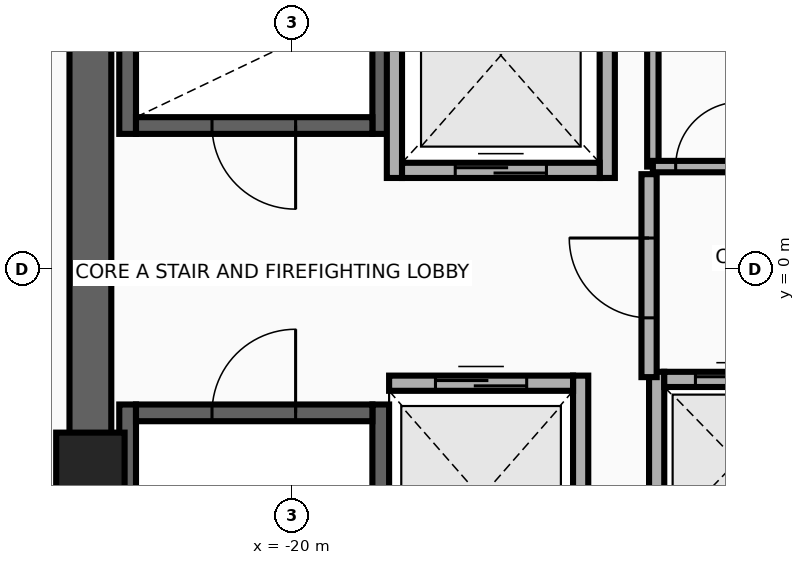
"""IFC4 building model, lengths in metres.
Left out: names, types, materials, properties, quantities, classifications, styles, units other than length and angle.
Written with IfcOpenShell. Run it as: python <this file> out.ifc"""

import sys

from ifc_helpers import new_model, si_unit, direction, frame, frame_2d, origin, origin_2d, place, context, subcontext, project, spatial, rectangle, extrude, source, transform, mapped, element, fill, save


model = new_model("IFC4")
c1 = context("Model", 3, precision=1e-05, world=origin(), true_north=direction((0.0, 1.0)))
c2 = subcontext(c1, "Body", "Model", "MODEL_VIEW")
j1 = project(units=[si_unit("LENGTHUNIT", "METRE"), si_unit("PLANEANGLEUNIT", "RADIAN")], contexts=[c1])
p1 = place(None, origin())
s1 = spatial("IfcSite", under=j1, at=p1, CompositionType="ELEMENT")
p2 = place(p1, origin())
s2 = spatial("IfcBuilding", under=s1, at=p2, CompositionType="ELEMENT")
p3 = place(p2, frame((0.0, 0.0, 219.5)))
s3 = spatial("IfcBuildingStorey", under=s2, at=p3, CompositionType="ELEMENT", Elevation=219.5)
for number, where, z_axis, x_axis in (
    (1, (-22.16, 1.78, 0.0), (0.0, 0.0, 1.0), (0.0, 1.0, 0.0)),
    (2, (-18.83, 1.78, 0.0), (0.0, 0.0, 1.0), (0.0, 1.0, 0.0)),
):
    element("IfcWall", number, at=place(p3, frame(where, z_axis=z_axis, x_axis=x_axis)), inside=s3, PredefinedType="SHEAR", context=c2, shape_type="SweptSolid", body=[
        extrude(rectangle(XDim=8.745, YDim=0.22, at=frame_2d((4.373, 0.0))), origin(), (0.0, 0.0, 1.0), 3.26),
    ])
p4 = place(p3, frame((-22.05, 1.89, 0.0), z_axis=(0.0, 0.0, 1.0), x_axis=(1.0, 0.0, 0.0)))
e3 = element("IfcWall", 3, at=p4, inside=s3, PredefinedType="SHEAR", context=c2, shape_type="SweptSolid", body=[
    extrude(rectangle(XDim=3.11, YDim=0.22, at=frame_2d((1.555, 0.0))), origin(), (0.0, 0.0, 1.0), 3.26),
])
p5 = place(p4, frame((1.0, 0.0, 0.0)))
e4 = element("IfcOpeningElement", 4, at=p5, cuts=e3, PredefinedType="OPENING", context=c2, shape_type="SweptSolid", body=[
    extrude(rectangle(XDim=1.1, YDim=2.15, at=frame_2d((0.55, 1.075))), frame((0.0, 0.125, 0.0), z_axis=(0.0, -1.0, 0.0), x_axis=(1.0, 0.0, 0.0)), (0.0, 0.0, 1.0), 0.25),
])
for number, where, z_axis, x_axis in (
    (5, (-22.16, -10.525, 0.0), (0.0, 0.0, 1.0), (0.0, 1.0, 0.0)),
    (6, (-18.83, -10.525, 0.0), (0.0, 0.0, 1.0), (0.0, 1.0, 0.0)),
):
    element("IfcWall", number, at=place(p3, frame(where, z_axis=z_axis, x_axis=x_axis)), inside=s3, PredefinedType="SHEAR", context=c2, shape_type="SweptSolid", body=[
        extrude(rectangle(XDim=8.745, YDim=0.22, at=frame_2d((4.373, 0.0))), origin(), (0.0, 0.0, 1.0), 3.26),
    ])
p6 = place(p3, frame((-22.05, -1.89, 0.0), z_axis=(0.0, 0.0, 1.0), x_axis=(1.0, 0.0, 0.0)))
e7 = element("IfcWall", 7, at=p6, inside=s3, PredefinedType="SHEAR", context=c2, shape_type="SweptSolid", body=[
    extrude(rectangle(XDim=3.11, YDim=0.22, at=frame_2d((1.555, 0.0))), origin(), (0.0, 0.0, 1.0), 3.26),
])
p7 = place(p6, frame((1.0, 0.0, 0.0)))
e8 = element("IfcOpeningElement", 8, at=p7, cuts=e7, PredefinedType="OPENING", context=c2, shape_type="SweptSolid", body=[
    extrude(rectangle(XDim=1.1, YDim=2.15, at=frame_2d((0.55, 1.075))), frame((0.0, 0.125, 0.0), z_axis=(0.0, -1.0, 0.0), x_axis=(1.0, 0.0, 0.0)), (0.0, 0.0, 1.0), 0.25),
])
p8 = place(p3, frame((-22.65, -11.075, 0.0), z_axis=(0.0, 0.0, 1.0), x_axis=(0.0, 1.0, 0.0)))
e9 = element("IfcWall", 9, at=p8, inside=s3, PredefinedType="SHEAR", context=c2, shape_type="SweptSolid", body=[
    extrude(rectangle(XDim=22.15, YDim=0.55, at=frame_2d((11.075, 0.0))), origin(), (0.0, 0.0, 1.0), 3.26),
])
m1 = source(origin(), c2, "Body", "SweptSolid", [
    extrude(rectangle(XDim=0.9, YDim=0.9, at=origin_2d()), origin(), (0.0, 0.0, 1.0), 3.5),
])
p9 = place(p3, frame((-22.65, -2.6, 0.0), z_axis=(0.0, 0.0, 1.0), x_axis=(1.0, 0.0, 0.0)))
e10 = element("IfcColumn", 10, at=p9, inside=s3, PredefinedType="COLUMN", context=c2, shape_type="MappedRepresentation", body=[
    mapped(m1, transform((0.0, 0.0, 0.0), x_axis=(1.0, 0.0, 0.0), y_axis=(0.0, 1.0, 0.0), z_axis=(0.0, 0.0, 1.0), scale=1.0)),
])
for number, where, z_axis, x_axis in (
    (11, (-18.65, 1.2, 0.0), (0.0, 0.0, 1.0), (0.0, 1.0, 0.0)),
    (12, (-15.85, 1.2, 0.0), (0.0, 0.0, 1.0), (0.0, 1.0, 0.0)),
):
    element("IfcWall", number, at=place(p3, frame(where, z_axis=z_axis, x_axis=x_axis)), inside=s3, PredefinedType="MOVABLE", context=c2, shape_type="SweptSolid", body=[
        extrude(rectangle(XDim=3.225, YDim=0.2, at=frame_2d((1.613, 0.0))), origin(), (0.0, 0.0, 1.0), 3.26),
    ])
p10 = place(p3, frame((-18.55, 1.3, 0.0), z_axis=(0.0, 0.0, 1.0), x_axis=(1.0, 0.0, 0.0)))
e13 = element("IfcWall", 13, at=p10, inside=s3, PredefinedType="MOVABLE", context=c2, shape_type="SweptSolid", body=[
    extrude(rectangle(XDim=2.6, YDim=0.2, at=frame_2d((1.3, 0.0))), origin(), (0.0, 0.0, 1.0), 3.26),
])
p11 = place(p10, frame((0.7, 0.0, 0.0)))
e14 = element("IfcOpeningElement", 14, at=p11, cuts=e13, PredefinedType="OPENING", context=c2, shape_type="SweptSolid", body=[
    extrude(rectangle(XDim=1.2, YDim=2.1, at=frame_2d((0.6, 1.05))), frame((0.0, 0.115, 0.0), z_axis=(0.0, -1.0, 0.0), x_axis=(1.0, 0.0, 0.0)), (0.0, 0.0, 1.0), 0.23),
])
p12 = place(p3, frame((-16.2, -4.6, 0.0), z_axis=(0.0, 0.0, 1.0), x_axis=(0.0, 1.0, 0.0)))
e15 = element("IfcWall", 15, at=p12, inside=s3, PredefinedType="MOVABLE", context=c2, shape_type="SweptSolid", body=[
    extrude(rectangle(XDim=3.2, YDim=0.2, at=frame_2d((1.6, 0.0))), origin(), (0.0, 0.0, 1.0), 3.26),
])
p13 = place(p3, frame((-18.72, -1.5, 0.0), z_axis=(0.0, 0.0, 1.0), x_axis=(1.0, 0.0, 0.0)))
e16 = element("IfcWall", 16, at=p13, inside=s3, PredefinedType="MOVABLE", context=c2, shape_type="SweptSolid", body=[
    extrude(rectangle(XDim=2.42, YDim=0.2, at=frame_2d((1.21, 0.0))), origin(), (0.0, 0.0, 1.0), 3.26),
])
p14 = place(p13, frame((0.61, 0.0, 0.0)))
e17 = element("IfcOpeningElement", 17, at=p14, cuts=e16, PredefinedType="OPENING", context=c2, shape_type="SweptSolid", body=[
    extrude(rectangle(XDim=1.2, YDim=2.1, at=frame_2d((0.6, 1.05))), frame((0.0, 0.115, 0.0), z_axis=(0.0, -1.0, 0.0), x_axis=(1.0, 0.0, 0.0)), (0.0, 0.0, 1.0), 0.23),
])
p15 = place(p3, frame((-15.2, -3.7, 0.0), z_axis=(0.0, 0.0, 1.0), x_axis=(0.0, 1.0, 0.0)))
e18 = element("IfcWall", 18, at=p15, inside=s3, PredefinedType="MOVABLE", context=c2, shape_type="SweptSolid", body=[
    extrude(rectangle(XDim=2.35, YDim=0.2, at=frame_2d((1.175, 0.0))), origin(), (0.0, 0.0, 1.0), 3.26),
])
p16 = place(p3, frame((-15.1, -1.45, 0.0), z_axis=(0.0, 0.0, 1.0), x_axis=(1.0, 0.0, 0.0)))
e19 = element("IfcWall", 19, at=p16, inside=s3, PredefinedType="MOVABLE", context=c2, shape_type="SweptSolid", body=[
    extrude(rectangle(XDim=1.92, YDim=0.2, at=frame_2d((0.96, 0.0))), origin(), (0.0, 0.0, 1.0), 3.26),
])
p17 = place(p16, frame((0.41, 0.0, 0.0)))
e20 = element("IfcOpeningElement", 20, at=p17, cuts=e19, PredefinedType="OPENING", context=c2, shape_type="SweptSolid", body=[
    extrude(rectangle(XDim=1.1, YDim=2.1, at=frame_2d((0.55, 1.05))), frame((0.0, 0.115, 0.0), z_axis=(0.0, -1.0, 0.0), x_axis=(1.0, 0.0, 0.0)), (0.0, 0.0, 1.0), 0.23),
])
p18 = place(p3, frame((-15.3, -1.42, 0.0), z_axis=(0.0, 0.0, 1.0), x_axis=(0.0, 1.0, 0.0)))
e21 = element("IfcWall", 21, at=p18, inside=s3, PredefinedType="PARTITIONING", context=c2, shape_type="SweptSolid", body=[
    extrude(rectangle(XDim=2.67, YDim=0.2, at=frame_2d((1.335, 0.0))), origin(), (0.0, 0.0, 1.0), 3.26),
])
p19 = place(p18, frame((0.78, 0.0, 0.0)))
e22 = element("IfcOpeningElement", 22, at=p19, cuts=e21, PredefinedType="OPENING", context=c2, shape_type="SweptSolid", body=[
    extrude(rectangle(XDim=1.05, YDim=2.15, at=frame_2d((0.525, 1.075))), frame((0.0, 0.115, 0.0), z_axis=(0.0, -1.0, 0.0), x_axis=(1.0, 0.0, 0.0)), (0.0, 0.0, 1.0), 0.23),
])
p20 = place(p3, frame((-15.25, 1.35, 0.0), z_axis=(0.0, 0.0, 1.0), x_axis=(0.0, 1.0, 0.0)))
e23 = element("IfcWall", 23, at=p20, inside=s3, PredefinedType="PARTITIONING", context=c2, shape_type="SweptSolid", body=[
    extrude(rectangle(XDim=1.95, YDim=0.15, at=frame_2d((0.975, 0.0))), origin(), (0.0, 0.0, 1.0), 3.26),
])
p21 = place(p3, frame((-15.25, 1.35, 0.0), z_axis=(0.0, 0.0, 1.0), x_axis=(1.0, 0.0, 0.0)))
e24 = element("IfcWall", 24, at=p21, inside=s3, PredefinedType="PARTITIONING", context=c2, shape_type="SweptSolid", body=[
    extrude(rectangle(XDim=2.1, YDim=0.15, at=frame_2d((1.05, 0.0))), origin(), (0.0, 0.0, 1.0), 3.26),
])
p22 = place(p21, frame((0.3, 0.0, 0.0)))
e25 = element("IfcOpeningElement", 25, at=p22, cuts=e24, PredefinedType="OPENING", context=c2, shape_type="SweptSolid", body=[
    extrude(rectangle(XDim=0.85, YDim=2.05, at=frame_2d((0.425, 1.025))), frame((0.0, 0.09, 0.0), z_axis=(0.0, -1.0, 0.0), x_axis=(1.0, 0.0, 0.0)), (0.0, 0.0, 1.0), 0.18),
])
p23 = place(p11, origin())
e26 = element("IfcDoor", 26, at=p23, inside=s3, OperationType="DOUBLE_DOOR_SLIDING", PredefinedType="DOOR", context=c2, shape_type="SweptSolid", body=[
    extrude(rectangle(XDim=1.2, YDim=2.1, at=frame_2d((0.6, 1.05))), frame((0.0, 0.025, 0.0), z_axis=(0.0, -1.0, 0.0), x_axis=(1.0, 0.0, 0.0)), (0.0, 0.0, 1.0), 0.05),
])
fill(e14, e26)
p24 = place(p14, origin())
e27 = element("IfcDoor", 27, at=p24, inside=s3, OperationType="DOUBLE_DOOR_SLIDING", PredefinedType="DOOR", context=c2, shape_type="SweptSolid", body=[
    extrude(rectangle(XDim=1.2, YDim=2.1, at=frame_2d((0.6, 1.05))), frame((0.0, 0.025, 0.0), z_axis=(0.0, -1.0, 0.0), x_axis=(1.0, 0.0, 0.0)), (0.0, 0.0, 1.0), 0.05),
])
fill(e17, e27)
p25 = place(p17, origin())
e28 = element("IfcDoor", 28, at=p25, inside=s3, OperationType="DOUBLE_DOOR_SLIDING", PredefinedType="DOOR", context=c2, shape_type="SweptSolid", body=[
    extrude(rectangle(XDim=1.1, YDim=2.1, at=frame_2d((0.55, 1.05))), frame((0.0, 0.025, 0.0), z_axis=(0.0, -1.0, 0.0), x_axis=(1.0, 0.0, 0.0)), (0.0, 0.0, 1.0), 0.05),
])
fill(e20, e28)
p26 = place(p19, origin())
e29 = element("IfcDoor", 29, at=p26, inside=s3, OperationType="SINGLE_SWING_RIGHT", PredefinedType="DOOR", context=c2, shape_type="SweptSolid", body=[
    extrude(rectangle(XDim=1.05, YDim=2.15, at=frame_2d((0.525, 1.075))), frame((0.0, 0.025, 0.0), z_axis=(0.0, -1.0, 0.0), x_axis=(1.0, 0.0, 0.0)), (0.0, 0.0, 1.0), 0.05),
])
fill(e22, e29)
p27 = place(p5, frame((1.1, 0.0, 0.0), z_axis=(0.0, 0.0, 1.0), x_axis=(-1.0, 0.0, 0.0)))
e30 = element("IfcDoor", 30, at=p27, inside=s3, OperationType="SINGLE_SWING_LEFT", PredefinedType="DOOR", context=c2, shape_type="SweptSolid", body=[
    extrude(rectangle(XDim=1.1, YDim=2.15, at=frame_2d((0.55, 1.075))), frame((0.0, 0.025, 0.0), z_axis=(0.0, -1.0, 0.0), x_axis=(1.0, 0.0, 0.0)), (0.0, 0.0, 1.0), 0.05),
])
fill(e4, e30)
p28 = place(p7, origin())
e31 = element("IfcDoor", 31, at=p28, inside=s3, OperationType="SINGLE_SWING_RIGHT", PredefinedType="DOOR", context=c2, shape_type="SweptSolid", body=[
    extrude(rectangle(XDim=1.1, YDim=2.15, at=frame_2d((0.55, 1.075))), frame((0.0, 0.025, 0.0), z_axis=(0.0, -1.0, 0.0), x_axis=(1.0, 0.0, 0.0)), (0.0, 0.0, 1.0), 0.05),
])
fill(e8, e31)
p29 = place(p22, origin())
e32 = element("IfcDoor", 32, at=p29, inside=s3, OperationType="SINGLE_SWING_LEFT", PredefinedType="DOOR", context=c2, shape_type="SweptSolid", body=[
    extrude(rectangle(XDim=0.85, YDim=2.05, at=frame_2d((0.425, 1.025))), frame((0.0, 0.025, 0.0), z_axis=(0.0, -1.0, 0.0), x_axis=(1.0, 0.0, 0.0)), (0.0, 0.0, 1.0), 0.05),
])
fill(e25, e32)
save(model, sys.argv[1])
